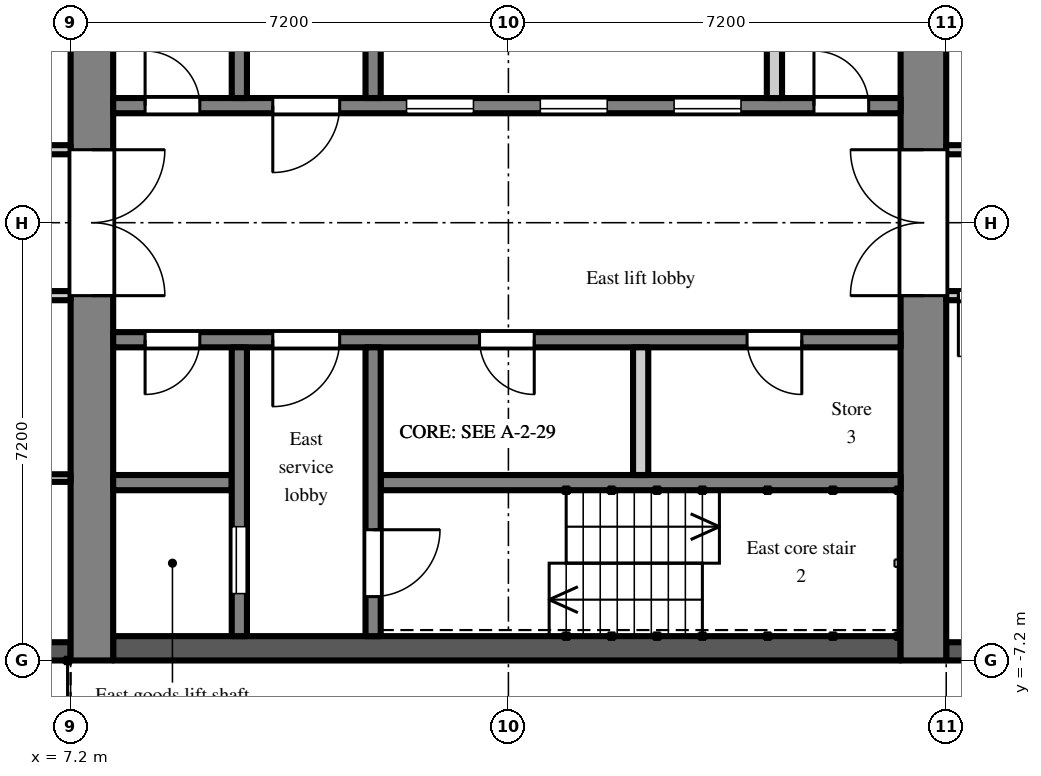
"""IFC4 building model, lengths in metres.
Left out: names, types, materials, properties, quantities, classifications, styles, units other than length and angle.
Written with IfcOpenShell. Run it as: python <this file> out.ifc"""

import sys

from ifc_helpers import new_model, si_unit, direction, frame, frame_2d, origin, place, context, subcontext, project, spatial, rectangle, extrude, element, fill, save


model = new_model("IFC4")
c1 = context("Model", 3, precision=1e-05, world=origin(), true_north=direction((0.0, 1.0)))
c2 = subcontext(c1, "Body", "Model", "MODEL_VIEW")
j1 = project(units=[si_unit("LENGTHUNIT", "METRE"), si_unit("PLANEANGLEUNIT", "RADIAN")], contexts=[c1])
p1 = place(None, origin())
s1 = spatial("IfcSite", under=j1, at=p1, CompositionType="ELEMENT")
p2 = place(p1, origin())
s2 = spatial("IfcBuilding", under=s1, at=p2, CompositionType="ELEMENT")
p3 = place(p2, frame((0.0, 0.0, 170.7)))
s3 = spatial("IfcBuildingStorey", under=s2, at=p3, CompositionType="ELEMENT", Elevation=170.7)
p4 = place(p3, frame((21.6, -7.05, 0.0), z_axis=(0.0, 0.0, 1.0), x_axis=(1.0, 0.0, 0.0)))
e1 = element("IfcWall", 1, at=p4, inside=s3, PredefinedType="SOLIDWALL", context=c2, shape_type="SweptSolid", body=[
    extrude(rectangle(XDim=2.7, YDim=0.3, at=frame_2d((1.35, 0.0))), origin(), (0.0, 0.0, 1.0), 2.2),
])
p5 = place(p4, frame((0.75, 0.0, 0.2)))
e2 = element("IfcOpeningElement", 2, at=p5, cuts=e1, PredefinedType="OPENING", context=c2, shape_type="SweptSolid", body=[
    extrude(rectangle(XDim=1.2, YDim=1.85, at=frame_2d((0.6, 0.925))), frame((0.0, 0.16, 0.0), z_axis=(0.0, -1.0, 0.0), x_axis=(1.0, 0.0, 0.0)), (0.0, 0.0, 1.0), 0.32),
])
p6 = place(p3, frame((4.2, -7.05, 0.0), z_axis=(0.0, 0.0, 1.0), x_axis=(1.0, 0.0, 0.0)))
e3 = element("IfcWall", 3, at=p6, inside=s3, PredefinedType="SOLIDWALL", context=c2, shape_type="SweptSolid", body=[
    extrude(rectangle(XDim=3.0, YDim=0.3, at=frame_2d((1.5, 0.0))), origin(), (0.0, 0.0, 1.0), 2.2),
])
p7 = place(p3, frame((7.55, -7.2, 0.0), z_axis=(0.0, 0.0, 1.0), x_axis=(0.0, 1.0, 0.0)))
e4 = element("IfcWall", 4, at=p7, inside=s3, PredefinedType="SHEAR", context=c2, shape_type="SweptSolid", body=[
    extrude(rectangle(XDim=14.4, YDim=0.7, at=frame_2d((7.2, 0.0))), origin(), (0.0, 0.0, 1.0), 2.6),
])
p8 = place(p7, frame((6.0, 0.0, 0.0)))
e5 = element("IfcOpeningElement", 5, at=p8, cuts=e4, PredefinedType="OPENING", context=c2, shape_type="SweptSolid", body=[
    extrude(rectangle(XDim=2.4, YDim=2.2, at=frame_2d((1.2, 1.1))), frame((0.0, 0.36, 0.0), z_axis=(0.0, -1.0, 0.0), x_axis=(1.0, 0.0, 0.0)), (0.0, 0.0, 1.0), 0.72),
])
p9 = place(p3, frame((21.225, -7.2, 0.0), z_axis=(0.0, 0.0, 1.0), x_axis=(0.0, 1.0, 0.0)))
e6 = element("IfcWall", 6, at=p9, inside=s3, PredefinedType="SHEAR", context=c2, shape_type="SweptSolid", body=[
    extrude(rectangle(XDim=14.4, YDim=0.75, at=frame_2d((7.2, 0.0))), origin(), (0.0, 0.0, 1.0), 2.6),
])
p10 = place(p9, frame((6.0, 0.0, 0.0)))
e7 = element("IfcOpeningElement", 7, at=p10, cuts=e6, PredefinedType="OPENING", context=c2, shape_type="SweptSolid", body=[
    extrude(rectangle(XDim=2.4, YDim=2.2, at=frame_2d((1.2, 1.1))), frame((0.0, 0.385, 0.0), z_axis=(0.0, -1.0, 0.0), x_axis=(1.0, 0.0, 0.0)), (0.0, 0.0, 1.0), 0.77),
])
p11 = place(p3, frame((7.9, 1.925, 0.0), z_axis=(0.0, 0.0, 1.0), x_axis=(1.0, 0.0, 0.0)))
e8 = element("IfcWall", 8, at=p11, inside=s3, PredefinedType="SHEAR", context=c2, shape_type="SweptSolid", body=[
    extrude(rectangle(XDim=12.95, YDim=0.25, at=frame_2d((6.475, 0.0))), origin(), (0.0, 0.0, 1.0), 2.6),
])
p12 = place(p11, frame((4.825, 0.0, 0.0)))
e9 = element("IfcOpeningElement", 9, at=p12, cuts=e8, PredefinedType="OPENING", context=c2, shape_type="SweptSolid", body=[
    extrude(rectangle(XDim=1.1, YDim=2.1, at=frame_2d((0.55, 1.05))), frame((0.0, 0.135, 0.0), z_axis=(0.0, -1.0, 0.0), x_axis=(1.0, 0.0, 0.0)), (0.0, 0.0, 1.0), 0.27),
])
p13 = place(p11, frame((7.025, 0.0, 0.0)))
e10 = element("IfcOpeningElement", 10, at=p13, cuts=e8, PredefinedType="OPENING", context=c2, shape_type="SweptSolid", body=[
    extrude(rectangle(XDim=1.1, YDim=2.1, at=frame_2d((0.55, 1.05))), frame((0.0, 0.135, 0.0), z_axis=(0.0, -1.0, 0.0), x_axis=(1.0, 0.0, 0.0)), (0.0, 0.0, 1.0), 0.27),
])
p14 = place(p11, frame((9.225, 0.0, 0.0)))
e11 = element("IfcOpeningElement", 11, at=p14, cuts=e8, PredefinedType="OPENING", context=c2, shape_type="SweptSolid", body=[
    extrude(rectangle(XDim=1.1, YDim=2.1, at=frame_2d((0.55, 1.05))), frame((0.0, 0.135, 0.0), z_axis=(0.0, -1.0, 0.0), x_axis=(1.0, 0.0, 0.0)), (0.0, 0.0, 1.0), 0.27),
])
p15 = place(p11, frame((0.525, 0.0, 0.0)))
e12 = element("IfcOpeningElement", 12, at=p15, cuts=e8, PredefinedType="OPENING", context=c2, shape_type="SweptSolid", body=[
    extrude(rectangle(XDim=0.9, YDim=2.1, at=frame_2d((0.45, 1.05))), frame((0.0, 0.135, 0.0), z_axis=(0.0, -1.0, 0.0), x_axis=(1.0, 0.0, 0.0)), (0.0, 0.0, 1.0), 0.27),
])
p16 = place(p11, frame((2.625, 0.0, 0.0)))
e13 = element("IfcOpeningElement", 13, at=p16, cuts=e8, PredefinedType="OPENING", context=c2, shape_type="SweptSolid", body=[
    extrude(rectangle(XDim=1.1, YDim=2.1, at=frame_2d((0.55, 1.05))), frame((0.0, 0.135, 0.0), z_axis=(0.0, -1.0, 0.0), x_axis=(1.0, 0.0, 0.0)), (0.0, 0.0, 1.0), 0.27),
])
p17 = place(p11, frame((11.525, 0.0, 0.0)))
e14 = element("IfcOpeningElement", 14, at=p17, cuts=e8, PredefinedType="OPENING", context=c2, shape_type="SweptSolid", body=[
    extrude(rectangle(XDim=0.9, YDim=2.1, at=frame_2d((0.45, 1.05))), frame((0.0, 0.135, 0.0), z_axis=(0.0, -1.0, 0.0), x_axis=(1.0, 0.0, 0.0)), (0.0, 0.0, 1.0), 0.27),
])
p18 = place(p3, frame((9.975, 2.05, 0.0), z_axis=(0.0, 0.0, 1.0), x_axis=(0.0, 1.0, 0.0)))
e15 = element("IfcWall", 15, at=p18, inside=s3, PredefinedType="SHEAR", context=c2, shape_type="SweptSolid", body=[
    extrude(rectangle(XDim=4.75, YDim=0.25, at=frame_2d((2.375, 0.0))), origin(), (0.0, 0.0, 1.0), 2.6),
])
p19 = place(p18, frame((2.95, 0.0, 0.0)))
e16 = element("IfcOpeningElement", 16, at=p19, cuts=e15, PredefinedType="OPENING", context=c2, shape_type="SweptSolid", body=[
    extrude(rectangle(XDim=1.1, YDim=2.1, at=frame_2d((0.55, 1.05))), frame((0.0, 0.135, 0.0), z_axis=(0.0, -1.0, 0.0), x_axis=(1.0, 0.0, 0.0)), (0.0, 0.0, 1.0), 0.27),
])
p20 = place(p3, frame((12.175, 2.05, 0.0), z_axis=(0.0, 0.0, 1.0), x_axis=(0.0, 1.0, 0.0)))
e17 = element("IfcWall", 17, at=p20, inside=s3, PredefinedType="SHEAR", context=c2, shape_type="SweptSolid", body=[
    extrude(rectangle(XDim=4.75, YDim=0.25, at=frame_2d((2.375, 0.0))), origin(), (0.0, 0.0, 1.0), 2.6),
])
p21 = place(p20, frame((3.0, 0.0, 0.0)))
e18 = element("IfcOpeningElement", 18, at=p21, cuts=e17, PredefinedType="OPENING", context=c2, shape_type="SweptSolid", body=[
    extrude(rectangle(XDim=1.1, YDim=2.1, at=frame_2d((0.55, 1.05))), frame((0.0, 0.135, 0.0), z_axis=(0.0, -1.0, 0.0), x_axis=(1.0, 0.0, 0.0)), (0.0, 0.0, 1.0), 0.27),
])
p22 = place(p3, frame((18.775, 2.05, 0.0), z_axis=(0.0, 0.0, 1.0), x_axis=(0.0, 1.0, 0.0)))
e19 = element("IfcWall", 19, at=p22, inside=s3, PredefinedType="PARTITIONING", context=c2, shape_type="SweptSolid", body=[
    extrude(rectangle(XDim=2.1, YDim=0.25, at=frame_2d((1.05, 0.0))), origin(), (0.0, 0.0, 1.0), 2.6),
])
p23 = place(p3, frame((7.9, -7.0, 0.0), z_axis=(0.0, 0.0, 1.0), x_axis=(1.0, 0.0, 0.0)))
e20 = element("IfcWall", 20, at=p23, inside=s3, PredefinedType="SHEAR", context=c2, shape_type="SweptSolid", body=[
    extrude(rectangle(XDim=12.95, YDim=0.4, at=frame_2d((6.475, 0.0))), origin(), (0.0, 0.0, 1.0), 2.6),
])
p24 = place(p3, frame((7.9, -1.925, 0.0), z_axis=(0.0, 0.0, 1.0), x_axis=(1.0, 0.0, 0.0)))
e21 = element("IfcWall", 21, at=p24, inside=s3, PredefinedType="SHEAR", context=c2, shape_type="SweptSolid", body=[
    extrude(rectangle(XDim=12.95, YDim=0.25, at=frame_2d((6.475, 0.0))), origin(), (0.0, 0.0, 1.0), 2.6),
])
p25 = place(p24, frame((0.525, 0.0, 0.0)))
e22 = element("IfcOpeningElement", 22, at=p25, cuts=e21, PredefinedType="OPENING", context=c2, shape_type="SweptSolid", body=[
    extrude(rectangle(XDim=0.9, YDim=2.1, at=frame_2d((0.45, 1.05))), frame((0.0, 0.135, 0.0), z_axis=(0.0, -1.0, 0.0), x_axis=(1.0, 0.0, 0.0)), (0.0, 0.0, 1.0), 0.27),
])
p26 = place(p24, frame((2.625, 0.0, 0.0)))
e23 = element("IfcOpeningElement", 23, at=p26, cuts=e21, PredefinedType="OPENING", context=c2, shape_type="SweptSolid", body=[
    extrude(rectangle(XDim=1.1, YDim=2.1, at=frame_2d((0.55, 1.05))), frame((0.0, 0.135, 0.0), z_axis=(0.0, -1.0, 0.0), x_axis=(1.0, 0.0, 0.0)), (0.0, 0.0, 1.0), 0.27),
])
p27 = place(p24, frame((6.025, 0.0, 0.0)))
e24 = element("IfcOpeningElement", 24, at=p27, cuts=e21, PredefinedType="OPENING", context=c2, shape_type="SweptSolid", body=[
    extrude(rectangle(XDim=0.9, YDim=2.1, at=frame_2d((0.45, 1.05))), frame((0.0, 0.135, 0.0), z_axis=(0.0, -1.0, 0.0), x_axis=(1.0, 0.0, 0.0)), (0.0, 0.0, 1.0), 0.27),
])
p28 = place(p24, frame((10.425, 0.0, 0.0)))
e25 = element("IfcOpeningElement", 25, at=p28, cuts=e21, PredefinedType="OPENING", context=c2, shape_type="SweptSolid", body=[
    extrude(rectangle(XDim=0.9, YDim=2.1, at=frame_2d((0.45, 1.05))), frame((0.0, 0.135, 0.0), z_axis=(0.0, -1.0, 0.0), x_axis=(1.0, 0.0, 0.0)), (0.0, 0.0, 1.0), 0.27),
])
p29 = place(p3, frame((7.9, -4.275, 0.0), z_axis=(0.0, 0.0, 1.0), x_axis=(1.0, 0.0, 0.0)))
e26 = element("IfcWall", 26, at=p29, inside=s3, PredefinedType="SHEAR", context=c2, shape_type="SweptSolid", body=[
    extrude(rectangle(XDim=1.95, YDim=0.25, at=frame_2d((0.975, 0.0))), origin(), (0.0, 0.0, 1.0), 2.6),
])
p30 = place(p3, frame((12.3, -4.275, 0.0), z_axis=(0.0, 0.0, 1.0), x_axis=(1.0, 0.0, 0.0)))
e27 = element("IfcWall", 27, at=p30, inside=s3, PredefinedType="SHEAR", context=c2, shape_type="SweptSolid", body=[
    extrude(rectangle(XDim=8.55, YDim=0.25, at=frame_2d((4.275, 0.0))), origin(), (0.0, 0.0, 1.0), 2.6),
])
p31 = place(p3, frame((9.975, -2.05, 0.0), z_axis=(0.0, 0.0, 1.0), x_axis=(0.0, -1.0, 0.0)))
e28 = element("IfcWall", 28, at=p31, inside=s3, PredefinedType="SHEAR", context=c2, shape_type="SweptSolid", body=[
    extrude(rectangle(XDim=4.75, YDim=0.25, at=frame_2d((2.375, 0.0))), origin(), (0.0, 0.0, 1.0), 2.6),
])
p32 = place(p31, frame((2.95, 0.0, 0.0)))
e29 = element("IfcOpeningElement", 29, at=p32, cuts=e28, PredefinedType="OPENING", context=c2, shape_type="SweptSolid", body=[
    extrude(rectangle(XDim=1.1, YDim=2.1, at=frame_2d((0.55, 1.05))), frame((0.0, 0.135, 0.0), z_axis=(0.0, -1.0, 0.0), x_axis=(1.0, 0.0, 0.0)), (0.0, 0.0, 1.0), 0.27),
])
p33 = place(p3, frame((12.175, -2.05, 0.0), z_axis=(0.0, 0.0, 1.0), x_axis=(0.0, -1.0, 0.0)))
e30 = element("IfcWall", 30, at=p33, inside=s3, PredefinedType="SHEAR", context=c2, shape_type="SweptSolid", body=[
    extrude(rectangle(XDim=4.75, YDim=0.25, at=frame_2d((2.375, 0.0))), origin(), (0.0, 0.0, 1.0), 2.6),
])
p34 = place(p33, frame((3.0, 0.0, 0.0)))
e31 = element("IfcOpeningElement", 31, at=p34, cuts=e30, PredefinedType="OPENING", context=c2, shape_type="SweptSolid", body=[
    extrude(rectangle(XDim=1.1, YDim=2.1, at=frame_2d((0.55, 1.05))), frame((0.0, 0.135, 0.0), z_axis=(0.0, -1.0, 0.0), x_axis=(1.0, 0.0, 0.0)), (0.0, 0.0, 1.0), 0.27),
])
p35 = place(p3, frame((16.575, -2.05, 0.0), z_axis=(0.0, 0.0, 1.0), x_axis=(0.0, -1.0, 0.0)))
e32 = element("IfcWall", 32, at=p35, inside=s3, PredefinedType="PARTITIONING", context=c2, shape_type="SweptSolid", body=[
    extrude(rectangle(XDim=2.1, YDim=0.25, at=frame_2d((1.05, 0.0))), origin(), (0.0, 0.0, 1.0), 2.6),
])
p36 = place(p3, frame((1.275, -4.2, 0.0), z_axis=(0.0, 0.0, 1.0), x_axis=(1.0, 0.0, 0.0)))
e33 = element("IfcWall", 33, at=p36, inside=s3, PredefinedType="PARTITIONING", context=c2, shape_type="SweptSolid", body=[
    extrude(rectangle(XDim=5.925, YDim=0.125, at=frame_2d((2.962, 0.0))), origin(), (0.0, 0.0, 1.0), 2.6),
])
p37 = place(p3, frame((1.275, -1.2, 0.0), z_axis=(0.0, 0.0, 1.0), x_axis=(1.0, 0.0, 0.0)))
e34 = element("IfcWall", 34, at=p37, inside=s3, PredefinedType="PARTITIONING", context=c2, shape_type="SweptSolid", body=[
    extrude(rectangle(XDim=5.925, YDim=0.15, at=frame_2d((2.962, 0.0))), origin(), (0.0, 0.0, 1.0), 2.6),
])
p38 = place(p37, frame((2.475, 0.0, 0.0)))
e35 = element("IfcOpeningElement", 35, at=p38, cuts=e34, PredefinedType="OPENING", context=c2, shape_type="SweptSolid", body=[
    extrude(rectangle(XDim=0.9, YDim=2.1, at=frame_2d((0.45, 1.05))), frame((0.0, 0.085, 0.0), z_axis=(0.0, -1.0, 0.0), x_axis=(1.0, 0.0, 0.0)), (0.0, 0.0, 1.0), 0.17),
])
p39 = place(p3, frame((1.275, 1.2, 0.0), z_axis=(0.0, 0.0, 1.0), x_axis=(1.0, 0.0, 0.0)))
e36 = element("IfcWall", 36, at=p39, inside=s3, PredefinedType="PARTITIONING", context=c2, shape_type="SweptSolid", body=[
    extrude(rectangle(XDim=5.925, YDim=0.15, at=frame_2d((2.962, 0.0))), origin(), (0.0, 0.0, 1.0), 2.6),
])
p40 = place(p39, frame((2.025, 0.0, 0.0)))
e37 = element("IfcOpeningElement", 37, at=p40, cuts=e36, PredefinedType="OPENING", context=c2, shape_type="SweptSolid", body=[
    extrude(rectangle(XDim=1.8, YDim=2.1, at=frame_2d((0.9, 1.05))), frame((0.0, 0.085, 0.0), z_axis=(0.0, -1.0, 0.0), x_axis=(1.0, 0.0, 0.0)), (0.0, 0.0, 1.0), 0.17),
])
p41 = place(p3, frame((21.6, -1.2, 0.0), z_axis=(0.0, 0.0, 1.0), x_axis=(1.0, 0.0, 0.0)))
e38 = element("IfcWall", 38, at=p41, inside=s3, PredefinedType="PARTITIONING", context=c2, shape_type="SweptSolid", body=[
    extrude(rectangle(XDim=3.525, YDim=0.15, at=frame_2d((1.762, 0.0))), origin(), (0.0, 0.0, 1.0), 2.6),
])
p42 = place(p41, frame((0.2, 0.0, 0.0)))
e39 = element("IfcOpeningElement", 39, at=p42, cuts=e38, PredefinedType="OPENING", context=c2, shape_type="SweptSolid", body=[
    extrude(rectangle(XDim=1.0, YDim=2.1, at=frame_2d((0.5, 1.05))), frame((0.0, 0.085, 0.0), z_axis=(0.0, -1.0, 0.0), x_axis=(1.0, 0.0, 0.0)), (0.0, 0.0, 1.0), 0.17),
])
p43 = place(p3, frame((21.6, 1.2, 0.0), z_axis=(0.0, 0.0, 1.0), x_axis=(1.0, 0.0, 0.0)))
e40 = element("IfcWall", 40, at=p43, inside=s3, PredefinedType="PARTITIONING", context=c2, shape_type="SweptSolid", body=[
    extrude(rectangle(XDim=3.525, YDim=0.15, at=frame_2d((1.762, 0.0))), origin(), (0.0, 0.0, 1.0), 2.6),
])
p44 = place(p43, frame((0.9, 0.0, 0.0)))
e41 = element("IfcOpeningElement", 41, at=p44, cuts=e40, PredefinedType="OPENING", context=c2, shape_type="SweptSolid", body=[
    extrude(rectangle(XDim=1.8, YDim=2.1, at=frame_2d((0.9, 1.05))), frame((0.0, 0.085, 0.0), z_axis=(0.0, -1.0, 0.0), x_axis=(1.0, 0.0, 0.0)), (0.0, 0.0, 1.0), 0.17),
])
p45 = place(p12, origin())
e42 = element("IfcDoor", 42, at=p45, inside=s3, OperationType="SLIDING_TO_LEFT", PredefinedType="DOOR", context=c2, shape_type="SweptSolid", body=[
    extrude(rectangle(XDim=1.1, YDim=2.1, at=frame_2d((0.55, 1.05))), frame((0.0, 0.025, 0.0), z_axis=(0.0, -1.0, 0.0), x_axis=(1.0, 0.0, 0.0)), (0.0, 0.0, 1.0), 0.05),
])
fill(e9, e42)
p46 = place(p13, origin())
e43 = element("IfcDoor", 43, at=p46, inside=s3, OperationType="SLIDING_TO_LEFT", PredefinedType="DOOR", context=c2, shape_type="SweptSolid", body=[
    extrude(rectangle(XDim=1.1, YDim=2.1, at=frame_2d((0.55, 1.05))), frame((0.0, 0.025, 0.0), z_axis=(0.0, -1.0, 0.0), x_axis=(1.0, 0.0, 0.0)), (0.0, 0.0, 1.0), 0.05),
])
fill(e10, e43)
p47 = place(p14, origin())
e44 = element("IfcDoor", 44, at=p47, inside=s3, OperationType="SLIDING_TO_LEFT", PredefinedType="DOOR", context=c2, shape_type="SweptSolid", body=[
    extrude(rectangle(XDim=1.1, YDim=2.1, at=frame_2d((0.55, 1.05))), frame((0.0, 0.025, 0.0), z_axis=(0.0, -1.0, 0.0), x_axis=(1.0, 0.0, 0.0)), (0.0, 0.0, 1.0), 0.05),
])
fill(e11, e44)
p48 = place(p32, origin())
e45 = element("IfcDoor", 45, at=p48, inside=s3, OperationType="SLIDING_TO_LEFT", PredefinedType="DOOR", context=c2, shape_type="SweptSolid", body=[
    extrude(rectangle(XDim=1.1, YDim=2.1, at=frame_2d((0.55, 1.05))), frame((0.0, 0.025, 0.0), z_axis=(0.0, -1.0, 0.0), x_axis=(1.0, 0.0, 0.0)), (0.0, 0.0, 1.0), 0.05),
])
fill(e29, e45)
p49 = place(p34, origin())
e46 = element("IfcDoor", 46, at=p49, inside=s3, OperationType="SINGLE_SWING_LEFT", PredefinedType="DOOR", context=c2, shape_type="SweptSolid", body=[
    extrude(rectangle(XDim=1.1, YDim=2.1, at=frame_2d((0.55, 1.05))), frame((0.0, 0.025, 0.0), z_axis=(0.0, -1.0, 0.0), x_axis=(1.0, 0.0, 0.0)), (0.0, 0.0, 1.0), 0.05),
])
fill(e31, e46)
p50 = place(p15, origin())
e47 = element("IfcDoor", 47, at=p50, inside=s3, OperationType="SINGLE_SWING_LEFT", PredefinedType="DOOR", context=c2, shape_type="SweptSolid", body=[
    extrude(rectangle(XDim=0.9, YDim=2.1, at=frame_2d((0.45, 1.05))), frame((0.0, 0.025, 0.0), z_axis=(0.0, -1.0, 0.0), x_axis=(1.0, 0.0, 0.0)), (0.0, 0.0, 1.0), 0.05),
])
fill(e12, e47)
p51 = place(p25, frame((0.9, 0.0, 0.0), z_axis=(0.0, 0.0, 1.0), x_axis=(-1.0, 0.0, 0.0)))
e48 = element("IfcDoor", 48, at=p51, inside=s3, OperationType="SINGLE_SWING_RIGHT", PredefinedType="DOOR", context=c2, shape_type="SweptSolid", body=[
    extrude(rectangle(XDim=0.9, YDim=2.1, at=frame_2d((0.45, 1.05))), frame((0.0, 0.025, 0.0), z_axis=(0.0, -1.0, 0.0), x_axis=(1.0, 0.0, 0.0)), (0.0, 0.0, 1.0), 0.05),
])
fill(e22, e48)
p52 = place(p16, frame((1.1, 0.0, 0.0), z_axis=(0.0, 0.0, 1.0), x_axis=(-1.0, 0.0, 0.0)))
e49 = element("IfcDoor", 49, at=p52, inside=s3, OperationType="SINGLE_SWING_RIGHT", PredefinedType="DOOR", context=c2, shape_type="SweptSolid", body=[
    extrude(rectangle(XDim=1.1, YDim=2.1, at=frame_2d((0.55, 1.05))), frame((0.0, 0.025, 0.0), z_axis=(0.0, -1.0, 0.0), x_axis=(1.0, 0.0, 0.0)), (0.0, 0.0, 1.0), 0.05),
])
fill(e13, e49)
p53 = place(p26, frame((1.1, 0.0, 0.0), z_axis=(0.0, 0.0, 1.0), x_axis=(-1.0, 0.0, 0.0)))
e50 = element("IfcDoor", 50, at=p53, inside=s3, OperationType="SINGLE_SWING_RIGHT", PredefinedType="DOOR", context=c2, shape_type="SweptSolid", body=[
    extrude(rectangle(XDim=1.1, YDim=2.1, at=frame_2d((0.55, 1.05))), frame((0.0, 0.025, 0.0), z_axis=(0.0, -1.0, 0.0), x_axis=(1.0, 0.0, 0.0)), (0.0, 0.0, 1.0), 0.05),
])
fill(e23, e50)
p54 = place(p8, frame((2.4, 0.0, 0.0), z_axis=(0.0, 0.0, 1.0), x_axis=(-1.0, 0.0, 0.0)))
e51 = element("IfcDoor", 51, at=p54, inside=s3, OperationType="DOUBLE_DOOR_DOUBLE_SWING", PredefinedType="DOOR", context=c2, shape_type="SweptSolid", body=[
    extrude(rectangle(XDim=2.4, YDim=2.2, at=frame_2d((1.2, 1.1))), frame((0.0, 0.025, 0.0), z_axis=(0.0, -1.0, 0.0), x_axis=(1.0, 0.0, 0.0)), (0.0, 0.0, 1.0), 0.05),
])
fill(e5, e51)
p55 = place(p10, origin())
e52 = element("IfcDoor", 52, at=p55, inside=s3, OperationType="DOUBLE_DOOR_DOUBLE_SWING", PredefinedType="DOOR", context=c2, shape_type="SweptSolid", body=[
    extrude(rectangle(XDim=2.4, YDim=2.2, at=frame_2d((1.2, 1.1))), frame((0.0, 0.025, 0.0), z_axis=(0.0, -1.0, 0.0), x_axis=(1.0, 0.0, 0.0)), (0.0, 0.0, 1.0), 0.05),
])
fill(e7, e52)
p56 = place(p17, origin())
e53 = element("IfcDoor", 53, at=p56, inside=s3, OperationType="SINGLE_SWING_LEFT", PredefinedType="DOOR", context=c2, shape_type="SweptSolid", body=[
    extrude(rectangle(XDim=0.9, YDim=2.1, at=frame_2d((0.45, 1.05))), frame((0.0, 0.025, 0.0), z_axis=(0.0, -1.0, 0.0), x_axis=(1.0, 0.0, 0.0)), (0.0, 0.0, 1.0), 0.05),
])
fill(e14, e53)
p57 = place(p27, frame((0.9, 0.0, 0.0), z_axis=(0.0, 0.0, 1.0), x_axis=(-1.0, 0.0, 0.0)))
e54 = element("IfcDoor", 54, at=p57, inside=s3, OperationType="SINGLE_SWING_LEFT", PredefinedType="DOOR", context=c2, shape_type="SweptSolid", body=[
    extrude(rectangle(XDim=0.9, YDim=2.1, at=frame_2d((0.45, 1.05))), frame((0.0, 0.025, 0.0), z_axis=(0.0, -1.0, 0.0), x_axis=(1.0, 0.0, 0.0)), (0.0, 0.0, 1.0), 0.05),
])
fill(e24, e54)
p58 = place(p28, frame((0.9, 0.0, 0.0), z_axis=(0.0, 0.0, 1.0), x_axis=(-1.0, 0.0, 0.0)))
e55 = element("IfcDoor", 55, at=p58, inside=s3, OperationType="SINGLE_SWING_LEFT", PredefinedType="DOOR", context=c2, shape_type="SweptSolid", body=[
    extrude(rectangle(XDim=0.9, YDim=2.1, at=frame_2d((0.45, 1.05))), frame((0.0, 0.025, 0.0), z_axis=(0.0, -1.0, 0.0), x_axis=(1.0, 0.0, 0.0)), (0.0, 0.0, 1.0), 0.05),
])
fill(e25, e55)
p59 = place(p42, frame((1.0, 0.0, 0.0), z_axis=(0.0, 0.0, 1.0), x_axis=(-1.0, 0.0, 0.0)))
e56 = element("IfcDoor", 56, at=p59, inside=s3, OperationType="SINGLE_SWING_RIGHT", PredefinedType="DOOR", context=c2, shape_type="SweptSolid", body=[
    extrude(rectangle(XDim=1.0, YDim=2.1, at=frame_2d((0.5, 1.05))), frame((0.0, 0.025, 0.0), z_axis=(0.0, -1.0, 0.0), x_axis=(1.0, 0.0, 0.0)), (0.0, 0.0, 1.0), 0.05),
])
fill(e39, e56)
save(model, sys.argv[1])
